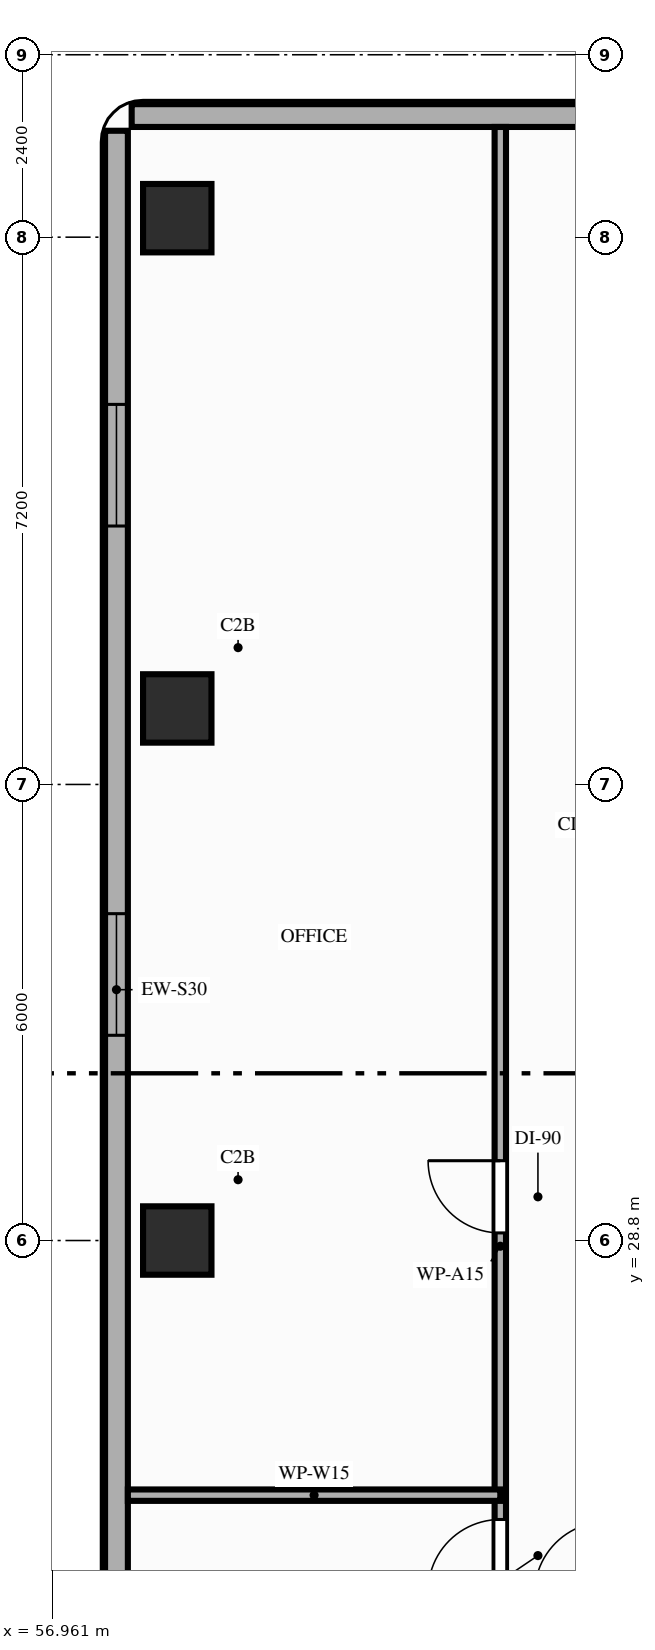
"""IFC4 building model, lengths in metres.
Left out: names, types, materials, properties, quantities, classifications, styles, units other than length and angle.
Written with IfcOpenShell. Run it as: python <this file> out.ifc"""

import sys

from ifc_helpers import new_model, si_unit, direction, frame, frame_2d, origin, origin_2d, place, context, subcontext, project, spatial, rectangle, extrude, element, fill, save


model = new_model("IFC4")
c1 = context("Model", 3, precision=1e-05, world=origin(), true_north=direction((0.0, 1.0)))
c2 = subcontext(c1, "Body", "Model", "MODEL_VIEW")
j1 = project(units=[si_unit("LENGTHUNIT", "METRE"), si_unit("PLANEANGLEUNIT", "RADIAN")], contexts=[c1])
p1 = place(None, origin())
s1 = spatial("IfcSite", under=j1, at=p1, CompositionType="ELEMENT")
p2 = place(p1, origin())
s2 = spatial("IfcBuilding", under=s1, at=p2, CompositionType="ELEMENT")
p3 = place(p2, frame((0.0, 0.0, 79.4)))
s3 = spatial("IfcBuildingStorey", under=s2, at=p3, CompositionType="ELEMENT", Elevation=79.4)
for number, where, z_axis, x_axis in (
    (1, (58.6, 28.8, 0.0), (0.0, 0.0, 1.0), (1.0, 0.0, 0.0)),
    (2, (58.6, 35.8, 0.0), (0.0, 0.0, 1.0), (1.0, 0.0, 0.0)),
    (3, (58.6, 42.25, 0.0), (0.0, 0.0, 1.0), (1.0, 0.0, 0.0)),
):
    element("IfcColumn", number, at=place(p3, frame(where, z_axis=z_axis, x_axis=x_axis)), inside=s3, PredefinedType="COLUMN", context=c2, shape_type="SweptSolid", body=[
        extrude(rectangle(XDim=0.9, YDim=0.9, at=origin_2d()), origin(), (0.0, 0.0, 1.0), 4.0),
    ])
p4 = place(p3, frame((57.8, 43.4, 0.0), z_axis=(0.0, 0.0, 1.0), x_axis=(0.0, -1.0, 0.0)))
e4 = element("IfcWall", 4, at=p4, inside=s3, PredefinedType="STANDARD", context=c2, shape_type="SweptSolid", body=[
    extrude(rectangle(XDim=22.6, YDim=0.3, at=frame_2d((11.3, 0.0))), origin(), (0.0, 0.0, 1.0), 3.4),
])
p5 = place(p4, frame((10.3, 0.0, 0.85)))
e5 = element("IfcOpeningElement", 5, at=p5, cuts=e4, PredefinedType="OPENING", context=c2, shape_type="SweptSolid", body=[
    extrude(rectangle(XDim=1.6, YDim=1.7, at=frame_2d((0.8, 0.85))), frame((0.0, 0.16, 0.0), z_axis=(0.0, -1.0, 0.0), x_axis=(1.0, 0.0, 0.0)), (0.0, 0.0, 1.0), 0.32),
])
p6 = place(p4, frame((3.6, 0.0, 0.85)))
e6 = element("IfcOpeningElement", 6, at=p6, cuts=e4, PredefinedType="OPENING", context=c2, shape_type="SweptSolid", body=[
    extrude(rectangle(XDim=1.6, YDim=1.7, at=frame_2d((0.8, 0.85))), frame((0.0, 0.16, 0.0), z_axis=(0.0, -1.0, 0.0), x_axis=(1.0, 0.0, 0.0)), (0.0, 0.0, 1.0), 0.32),
])
p7 = place(p3, frame((72.8, 43.6, 0.0), z_axis=(0.0, 0.0, 1.0), x_axis=(-1.0, 0.0, 0.0)))
e7 = element("IfcWall", 7, at=p7, inside=s3, PredefinedType="STANDARD", context=c2, shape_type="SweptSolid", body=[
    extrude(rectangle(XDim=14.8, YDim=0.3, at=frame_2d((7.4, 0.0))), origin(), (0.0, 0.0, 1.0), 3.82),
])
p8 = place(p3, frame((62.85, 20.75, 0.0), z_axis=(0.0, 0.0, 1.0), x_axis=(0.0, 1.0, 0.0)))
e8 = element("IfcWall", 8, at=p8, inside=s3, PredefinedType="PARTITIONING", context=c2, shape_type="SweptSolid", body=[
    extrude(rectangle(XDim=22.7, YDim=0.15, at=frame_2d((11.35, 0.0))), origin(), (0.0, 0.0, 1.0), 3.4),
])
p9 = place(p8, frame((0.73, 0.0, 0.0)))
e9 = element("IfcOpeningElement", 9, at=p9, cuts=e8, PredefinedType="OPENING", context=c2, shape_type="SweptSolid", body=[
    extrude(rectangle(XDim=0.85, YDim=2.1, at=frame_2d((0.425, 1.05))), frame((0.0, 0.085, 0.0), z_axis=(0.0, -1.0, 0.0), x_axis=(1.0, 0.0, 0.0)), (0.0, 0.0, 1.0), 0.17),
])
p10 = place(p8, frame((3.43, 0.0, 0.0)))
e10 = element("IfcOpeningElement", 10, at=p10, cuts=e8, PredefinedType="OPENING", context=c2, shape_type="SweptSolid", body=[
    extrude(rectangle(XDim=0.95, YDim=2.1, at=frame_2d((0.475, 1.05))), frame((0.0, 0.085, 0.0), z_axis=(0.0, -1.0, 0.0), x_axis=(1.0, 0.0, 0.0)), (0.0, 0.0, 1.0), 0.17),
])
p11 = place(p8, frame((8.15, 0.0, 0.0)))
e11 = element("IfcOpeningElement", 11, at=p11, cuts=e8, PredefinedType="OPENING", context=c2, shape_type="SweptSolid", body=[
    extrude(rectangle(XDim=0.95, YDim=2.15, at=frame_2d((0.475, 1.075))), frame((0.0, 0.085, 0.0), z_axis=(0.0, -1.0, 0.0), x_axis=(1.0, 0.0, 0.0)), (0.0, 0.0, 1.0), 0.17),
])
p12 = place(p3, frame((57.95, 25.45, 0.0), z_axis=(0.0, 0.0, 1.0), x_axis=(1.0, 0.0, 0.0)))
e12 = element("IfcWall", 12, at=p12, inside=s3, PredefinedType="PARTITIONING", context=c2, shape_type="SweptSolid", body=[
    extrude(rectangle(XDim=4.9, YDim=0.15, at=frame_2d((2.45, 0.0))), origin(), (0.0, 0.0, 1.0), 3.4),
])
p13 = place(p5, origin())
e13 = element("IfcWindow", 13, at=p13, inside=s3, PartitioningType="SINGLE_PANEL", PredefinedType="WINDOW", context=c2, shape_type="SweptSolid", body=[
    extrude(rectangle(XDim=1.6, YDim=1.7, at=frame_2d((0.8, 0.85))), frame((0.0, 0.03, 0.0), z_axis=(0.0, -1.0, 0.0), x_axis=(1.0, 0.0, 0.0)), (0.0, 0.0, 1.0), 0.06),
])
fill(e5, e13)
p14 = place(p6, origin())
e14 = element("IfcWindow", 14, at=p14, inside=s3, PartitioningType="SINGLE_PANEL", PredefinedType="WINDOW", context=c2, shape_type="SweptSolid", body=[
    extrude(rectangle(XDim=1.6, YDim=1.7, at=frame_2d((0.8, 0.85))), frame((0.0, 0.03, 0.0), z_axis=(0.0, -1.0, 0.0), x_axis=(1.0, 0.0, 0.0)), (0.0, 0.0, 1.0), 0.06),
])
fill(e6, e14)
p15 = place(p10, origin())
e15 = element("IfcDoor", 15, at=p15, inside=s3, OperationType="SINGLE_SWING_LEFT", PredefinedType="DOOR", context=c2, shape_type="SweptSolid", body=[
    extrude(rectangle(XDim=0.95, YDim=2.1, at=frame_2d((0.475, 1.05))), frame((0.0, 0.025, 0.0), z_axis=(0.0, -1.0, 0.0), x_axis=(1.0, 0.0, 0.0)), (0.0, 0.0, 1.0), 0.05),
])
fill(e10, e15)
p16 = place(p11, origin())
e16 = element("IfcDoor", 16, at=p16, inside=s3, OperationType="SINGLE_SWING_RIGHT", PredefinedType="DOOR", context=c2, shape_type="SweptSolid", body=[
    extrude(rectangle(XDim=0.95, YDim=2.15, at=frame_2d((0.475, 1.075))), frame((0.0, 0.025, 0.0), z_axis=(0.0, -1.0, 0.0), x_axis=(1.0, 0.0, 0.0)), (0.0, 0.0, 1.0), 0.05),
])
fill(e11, e16)
save(model, sys.argv[1])
